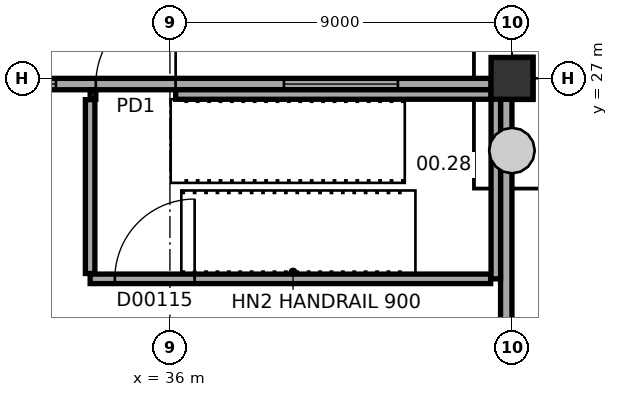
"""IFC4 building model, lengths in metres.
Left out: names, types, materials, properties, quantities, classifications, styles, units other than length and angle.
Written with IfcOpenShell. Run it as: python <this file> out.ifc"""

import sys

from ifc_helpers import new_model, si_unit, direction, frame, frame_2d, origin, origin_2d, place, context, subcontext, project, spatial, rectangle, extrude, element, fill, save


model = new_model("IFC4")
c1 = context("Model", 3, precision=1e-05, world=origin(), true_north=direction((0.0, 1.0)))
c2 = subcontext(c1, "Body", "Model", "MODEL_VIEW")
j1 = project(units=[si_unit("LENGTHUNIT", "METRE"), si_unit("PLANEANGLEUNIT", "RADIAN")], contexts=[c1])
p1 = place(None, origin())
s1 = spatial("IfcSite", under=j1, at=p1, CompositionType="ELEMENT")
p2 = place(p1, origin())
s2 = spatial("IfcBuilding", under=s1, at=p2, CompositionType="ELEMENT")
p3 = place(p2, origin())
s3 = spatial("IfcBuildingStorey", under=s2, at=p3, CompositionType="ELEMENT", Elevation=0.0)
p4 = place(p3, frame((45.0, 27.0, -0.3), z_axis=(0.0, 0.0, 1.0), x_axis=(1.0, 0.0, 0.0)))
e1 = element("IfcColumn", 1, at=p4, inside=s3, PredefinedType="COLUMN", context=c2, shape_type="SweptSolid", body=[
    extrude(rectangle(XDim=1.1, YDim=1.1, at=origin_2d()), origin(), (0.0, 0.0, 1.0), 7.8),
])
p5 = place(p3, frame((44.85, 9.55, 0.0), z_axis=(0.0, 0.0, 1.0), x_axis=(0.0, 1.0, 0.0)))
e2 = element("IfcWall", 2, at=p5, inside=s3, PredefinedType="STANDARD", context=c2, shape_type="SweptSolid", body=[
    extrude(rectangle(XDim=16.9, YDim=0.3, at=frame_2d((8.45, 0.0))), origin(), (0.0, 0.0, 1.0), 6.0),
])
p6 = place(p5, frame((1.8, 0.0, 0.0)))
e3 = element("IfcOpeningElement", 3, at=p6, cuts=e2, PredefinedType="OPENING", context=c2, shape_type="SweptSolid", body=[
    extrude(rectangle(XDim=1.3, YDim=2.4, at=frame_2d((0.65, 1.2))), frame((0.0, 0.16, 0.0), z_axis=(0.0, -1.0, 0.0), x_axis=(1.0, 0.0, 0.0)), (0.0, 0.0, 1.0), 0.32),
])
p7 = place(p5, frame((5.3, 0.0, 0.0)))
e4 = element("IfcOpeningElement", 4, at=p7, cuts=e2, PredefinedType="OPENING", context=c2, shape_type="SweptSolid", body=[
    extrude(rectangle(XDim=1.3, YDim=2.4, at=frame_2d((0.65, 1.2))), frame((0.0, 0.16, 0.0), z_axis=(0.0, -1.0, 0.0), x_axis=(1.0, 0.0, 0.0)), (0.0, 0.0, 1.0), 0.32),
])
p8 = place(p5, frame((8.8, 0.0, 0.0)))
e5 = element("IfcOpeningElement", 5, at=p8, cuts=e2, PredefinedType="OPENING", context=c2, shape_type="SweptSolid", body=[
    extrude(rectangle(XDim=1.3, YDim=2.4, at=frame_2d((0.65, 1.2))), frame((0.0, 0.16, 0.0), z_axis=(0.0, -1.0, 0.0), x_axis=(1.0, 0.0, 0.0)), (0.0, 0.0, 1.0), 0.32),
])
p9 = place(p3, frame((44.45, 26.85, 0.0), z_axis=(0.0, 0.0, 1.0), x_axis=(-1.0, 0.0, 0.0)))
e6 = element("IfcWall", 6, at=p9, inside=s3, PredefinedType="STANDARD", context=c2, shape_type="SweptSolid", body=[
    extrude(rectangle(XDim=16.9, YDim=0.3, at=frame_2d((8.45, 0.0))), origin(), (0.0, 0.0, 1.0), 6.0),
])
p10 = place(p9, frame((2.45, 0.0, 4.7)))
e7 = element("IfcOpeningElement", 7, at=p10, cuts=e6, PredefinedType="OPENING", context=c2, shape_type="SweptSolid", body=[
    extrude(rectangle(XDim=3.0, YDim=1.3, at=frame_2d((1.5, 0.65))), frame((0.0, 0.16, 0.0), z_axis=(0.0, -1.0, 0.0), x_axis=(1.0, 0.0, 0.0)), (0.0, 0.0, 1.0), 0.32),
])
p11 = place(p9, frame((11.45, 0.0, 4.7)))
e8 = element("IfcOpeningElement", 8, at=p11, cuts=e6, PredefinedType="OPENING", context=c2, shape_type="SweptSolid", body=[
    extrude(rectangle(XDim=3.0, YDim=1.3, at=frame_2d((1.5, 0.65))), frame((0.0, 0.16, 0.0), z_axis=(0.0, -1.0, 0.0), x_axis=(1.0, 0.0, 0.0)), (0.0, 0.0, 1.0), 0.32),
])
p12 = place(p9, frame((13.1, 0.0, 0.0)))
e9 = element("IfcOpeningElement", 9, at=p12, cuts=e6, PredefinedType="OPENING", context=c2, shape_type="SweptSolid", body=[
    extrude(rectangle(XDim=1.3, YDim=2.4, at=frame_2d((0.65, 1.2))), frame((0.0, 0.16, 0.0), z_axis=(0.0, -1.0, 0.0), x_axis=(1.0, 0.0, 0.0)), (0.0, 0.0, 1.0), 0.32),
])
p13 = place(p9, frame((8.3, 0.0, 0.0)))
e10 = element("IfcOpeningElement", 10, at=p13, cuts=e6, PredefinedType="OPENING", context=c2, shape_type="SweptSolid", body=[
    extrude(rectangle(XDim=2.1, YDim=2.4, at=frame_2d((1.05, 1.2))), frame((0.0, 0.16, 0.0), z_axis=(0.0, -1.0, 0.0), x_axis=(1.0, 0.0, 0.0)), (0.0, 0.0, 1.0), 0.32),
])
p14 = place(p3, frame((44.44, 21.725, 0.0), z_axis=(0.0, 0.0, 1.0), x_axis=(-1.0, 0.0, 0.0)))
e11 = element("IfcWall", 11, at=p14, inside=s3, PredefinedType="SOLIDWALL", context=c2, shape_type="SweptSolid", body=[
    extrude(rectangle(XDim=10.54, YDim=0.25, at=frame_2d((5.27, 0.0))), origin(), (0.0, 0.0, 1.0), 7.2),
])
p15 = place(p14, frame((7.79, 0.0, 0.0)))
e12 = element("IfcOpeningElement", 12, at=p15, cuts=e11, PredefinedType="OPENING", context=c2, shape_type="SweptSolid", body=[
    extrude(rectangle(XDim=2.1, YDim=2.4, at=frame_2d((1.05, 1.2))), frame((0.0, 0.135, 0.0), z_axis=(0.0, -1.0, 0.0), x_axis=(1.0, 0.0, 0.0)), (0.0, 0.0, 1.0), 0.27),
])
p16 = place(p3, frame((33.9, 21.865, 0.0), z_axis=(0.0, 0.0, 1.0), x_axis=(0.0, 1.0, 0.0)))
e13 = element("IfcWall", 13, at=p16, inside=s3, PredefinedType="SOLIDWALL", context=c2, shape_type="SweptSolid", body=[
    extrude(rectangle(XDim=4.575, YDim=0.25, at=frame_2d((2.288, 0.0))), origin(), (0.0, 0.0, 1.0), 7.2),
])
p17 = place(p3, frame((44.575, 21.725, 0.0), z_axis=(0.0, 0.0, 1.0), x_axis=(0.0, 1.0, 0.0)))
e14 = element("IfcWall", 14, at=p17, inside=s3, PredefinedType="SOLIDWALL", context=c2, shape_type="SweptSolid", body=[
    extrude(rectangle(XDim=4.975, YDim=0.25, at=frame_2d((2.487, 0.0))), origin(), (0.0, 0.0, 1.0), 7.2),
])
p18 = place(p3, frame((44.45, 26.575, 0.0), z_axis=(0.0, 0.0, 1.0), x_axis=(-1.0, 0.0, 0.0)))
e15 = element("IfcWall", 15, at=p18, inside=s3, PredefinedType="SOLIDWALL", context=c2, shape_type="SweptSolid", body=[
    extrude(rectangle(XDim=8.3, YDim=0.25, at=frame_2d((4.15, 0.0))), origin(), (0.0, 0.0, 1.0), 7.2),
])
p19 = place(p3, frame((34.05, 26.575, 0.0), z_axis=(0.0, 0.0, 1.0), x_axis=(-1.0, 0.0, 0.0)))
e16 = element("IfcWall", 16, at=p19, inside=s3, PredefinedType="SOLIDWALL", context=c2, shape_type="SweptSolid", body=[
    extrude(rectangle(XDim=0.15, YDim=0.25, at=frame_2d((0.075, 0.0))), origin(), (0.0, 0.0, 1.0), 7.2),
])
p20 = place(p10, origin())
e17 = element("IfcWindow", 17, at=p20, inside=s3, PartitioningType="SINGLE_PANEL", PredefinedType="WINDOW", context=c2, shape_type="SweptSolid", body=[
    extrude(rectangle(XDim=3.0, YDim=1.3, at=frame_2d((1.5, 0.65))), frame((0.0, 0.03, 0.0), z_axis=(0.0, -1.0, 0.0), x_axis=(1.0, 0.0, 0.0)), (0.0, 0.0, 1.0), 0.06),
])
fill(e7, e17)
p21 = place(p11, origin())
e18 = element("IfcWindow", 18, at=p21, inside=s3, PartitioningType="SINGLE_PANEL", PredefinedType="WINDOW", context=c2, shape_type="SweptSolid", body=[
    extrude(rectangle(XDim=3.0, YDim=1.3, at=frame_2d((1.5, 0.65))), frame((0.0, 0.03, 0.0), z_axis=(0.0, -1.0, 0.0), x_axis=(1.0, 0.0, 0.0)), (0.0, 0.0, 1.0), 0.06),
])
fill(e8, e18)
p22 = place(p15, frame((2.1, 0.0, 0.0), z_axis=(0.0, 0.0, 1.0), x_axis=(-1.0, 0.0, 0.0)))
e19 = element("IfcDoor", 19, at=p22, inside=s3, OperationType="DOUBLE_DOOR_SINGLE_SWING", PredefinedType="DOOR", context=c2, shape_type="SweptSolid", body=[
    extrude(rectangle(XDim=2.1, YDim=2.4, at=frame_2d((1.05, 1.2))), frame((0.0, 0.025, 0.0), z_axis=(0.0, -1.0, 0.0), x_axis=(1.0, 0.0, 0.0)), (0.0, 0.0, 1.0), 0.05),
])
fill(e12, e19)
p23 = place(p13, frame((2.1, 0.0, 0.0), z_axis=(0.0, 0.0, 1.0), x_axis=(-1.0, 0.0, 0.0)))
e20 = element("IfcDoor", 20, at=p23, inside=s3, OperationType="DOUBLE_DOOR_SINGLE_SWING", PredefinedType="DOOR", context=c2, shape_type="SweptSolid", body=[
    extrude(rectangle(XDim=2.1, YDim=2.4, at=frame_2d((1.05, 1.2))), frame((0.0, 0.025, 0.0), z_axis=(0.0, -1.0, 0.0), x_axis=(1.0, 0.0, 0.0)), (0.0, 0.0, 1.0), 0.05),
])
fill(e10, e20)
save(model, sys.argv[1])
